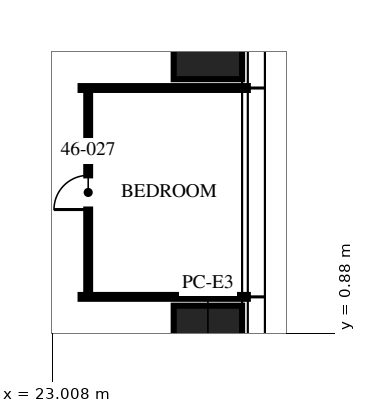
"""IFC4 building model, lengths in metres.
Left out: names, types, materials, properties, quantities, classifications, styles, units other than length and angle.
Written with IfcOpenShell. Run it as: python <this file> out.ifc"""

import sys

from ifc_helpers import new_model, si_unit, direction, frame, frame_2d, origin, origin_2d, place, context, subcontext, project, spatial, rectangle, hollow_rectangle, extrude, element, fill, save


model = new_model("IFC4")
c1 = context("Model", 3, precision=1e-05, world=origin(), true_north=direction((0.0, 1.0)))
c2 = subcontext(c1, "Body", "Model", "MODEL_VIEW")
j1 = project(units=[si_unit("LENGTHUNIT", "METRE"), si_unit("PLANEANGLEUNIT", "RADIAN")], contexts=[c1])
p1 = place(None, origin())
s1 = spatial("IfcSite", under=j1, at=p1, CompositionType="ELEMENT")
p2 = place(p1, origin())
s2 = spatial("IfcBuilding", under=s1, at=p2, CompositionType="ELEMENT")
p3 = place(p2, frame((0.0, 0.0, 182.25)))
s3 = spatial("IfcBuildingStorey", under=s2, at=p3, CompositionType="ELEMENT", Elevation=182.25)
for number, where, z_axis, x_axis in (
    (1, (27.1, 9.16, 0.0), (0.0, 0.0, 1.0), (0.0, 1.0, 0.0)),
    (2, (27.1, 0.0, 0.0), (0.0, 0.0, 1.0), (0.0, 1.0, 0.0)),
):
    element("IfcColumn", number, at=place(p3, frame(where, z_axis=z_axis, x_axis=x_axis)), inside=s3, PredefinedType="COLUMN", context=c2, shape_type="SweptSolid", body=[
        extrude(hollow_rectangle(XDim=3.2, YDim=1.8, WallThickness=0.2, at=origin_2d()), origin(), (0.0, 0.0, 1.0), 3.75),
    ])
for number, where, z_axis, x_axis in (
    (3, (23.75, 1.832, 0.0), (0.0, 0.0, 1.0), (1.0, 0.0, 0.0)),
    (4, (23.75, 7.328, 0.0), (0.0, 0.0, 1.0), (1.0, 0.0, 0.0)),
):
    element("IfcWall", number, at=place(p3, frame(where, z_axis=z_axis, x_axis=x_axis)), inside=s3, PredefinedType="PARTITIONING", context=c2, shape_type="SweptSolid", body=[
        extrude(rectangle(XDim=4.4, YDim=0.1, at=frame_2d((2.2, 0.0))), origin(), (0.0, 0.0, 1.0), 2.56),
    ])
p4 = place(p3, frame((23.95, 1.832, 0.0), z_axis=(0.0, 0.0, 1.0), x_axis=(0.0, 1.0, 0.0)))
e5 = element("IfcWall", 5, at=p4, inside=s3, PredefinedType="PARTITIONING", context=c2, shape_type="SweptSolid", body=[
    extrude(rectangle(XDim=5.496, YDim=0.1, at=frame_2d((2.748, 0.0))), origin(), (0.0, 0.0, 1.0), 2.56),
])
p5 = place(p4, frame((2.298, 0.0, 0.0)))
e6 = element("IfcOpeningElement", 6, at=p5, cuts=e5, PredefinedType="OPENING", context=c2, shape_type="SweptSolid", body=[
    extrude(rectangle(XDim=0.9, YDim=2.1, at=frame_2d((0.45, 1.05))), frame((0.0, 0.06, 0.0), z_axis=(0.0, -1.0, 0.0), x_axis=(1.0, 0.0, 0.0)), (0.0, 0.0, 1.0), 0.12),
])
p6 = place(p5, origin())
e7 = element("IfcDoor", 7, at=p6, inside=s3, OperationType="SINGLE_SWING_LEFT", PredefinedType="DOOR", context=c2, shape_type="SweptSolid", body=[
    extrude(rectangle(XDim=0.9, YDim=2.1, at=frame_2d((0.45, 1.05))), frame((0.0, 0.025, 0.0), z_axis=(0.0, -1.0, 0.0), x_axis=(1.0, 0.0, 0.0)), (0.0, 0.0, 1.0), 0.05),
])
fill(e6, e7)
save(model, sys.argv[1])
